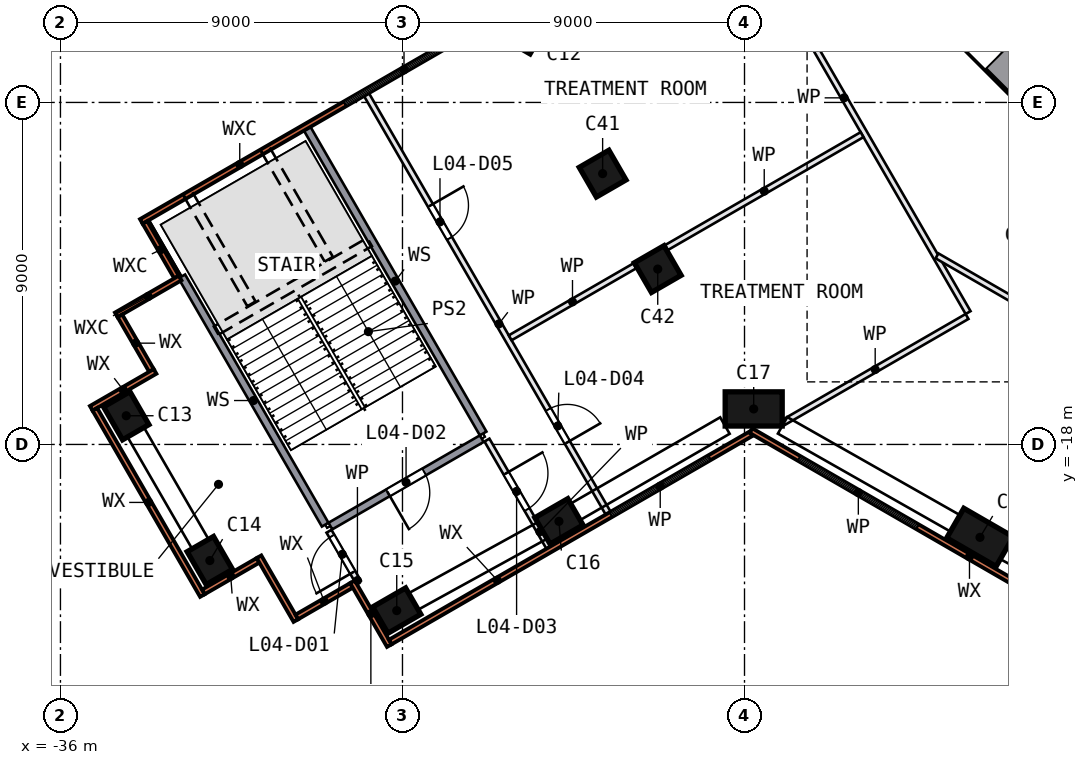
"""IFC4 building model, lengths in metres.
Left out: names, types, materials, properties, quantities, classifications, styles, units other than length and angle.
Written with IfcOpenShell. Run it as: python <this file> out.ifc"""

import sys

from ifc_helpers import new_model, si_unit, direction, frame, frame_2d, origin, origin_2d, place, context, subcontext, project, spatial, rectangle, extrude, element, fill, save


model = new_model("IFC4")
c1 = context("Model", 3, precision=1e-05, world=origin(), true_north=direction((0.0, 1.0)))
c2 = subcontext(c1, "Body", "Model", "MODEL_VIEW")
j1 = project(units=[si_unit("LENGTHUNIT", "METRE"), si_unit("PLANEANGLEUNIT", "RADIAN")], contexts=[c1])
p1 = place(None, origin())
s1 = spatial("IfcSite", under=j1, at=p1, CompositionType="ELEMENT")
p2 = place(p1, origin())
s2 = spatial("IfcBuilding", under=s1, at=p2, CompositionType="ELEMENT")
p3 = place(p2, frame((0.0, 0.0, 23.5)))
s3 = spatial("IfcBuildingStorey", under=s2, at=p3, CompositionType="ELEMENT", Elevation=23.5)
p4 = place(p3, frame((-23.658, -6.846, 0.0), z_axis=(0.0, 0.0, 1.0), x_axis=(0.5, 0.866025404, 0.0)))
e1 = element("IfcColumn", 1, at=p4, inside=s3, PredefinedType="COLUMN", context=c2, shape_type="SweptSolid", body=[
    extrude(rectangle(XDim=1.5, YDim=0.9, at=origin_2d()), origin(), (0.0, 0.0, 1.0), 4.0),
])
for number, where, z_axis, x_axis in (
    (2, (-34.269, -17.245, 0.0), (0.0, 0.0, 1.0), (0.5, -0.866, 0.0)),
    (3, (-32.069, -21.055, 0.0), (0.0, 0.0, 1.0), (0.5, -0.866, 0.0)),
    (4, (-27.151, -22.373, 0.0), (0.0, 0.0, 1.0), (0.866, 0.5, 0.0)),
    (5, (-22.883, -20.024, 0.0), (0.0, 0.0, 1.0), (0.866, 0.5, 0.0)),
):
    element("IfcColumn", number, at=place(p3, frame(where, z_axis=z_axis, x_axis=x_axis)), inside=s3, PredefinedType="COLUMN", context=c2, shape_type="SweptSolid", body=[
        extrude(rectangle(XDim=1.0, YDim=0.8, at=origin_2d()), origin(), (0.0, 0.0, 1.0), 4.0),
    ])
for number, where, z_axis, x_axis in (
    (6, (-17.758, -17.065, 0.0), (0.0, 0.0, 1.0), (-1.0, 0.0, 0.0)),
    (7, (-11.804, -20.445, 0.0), (0.0, 0.0, 1.0), (0.866, -0.5, 0.0)),
):
    element("IfcColumn", number, at=place(p3, frame(where, z_axis=z_axis, x_axis=x_axis)), inside=s3, PredefinedType="COLUMN", context=c2, shape_type="SweptSolid", body=[
        extrude(rectangle(XDim=1.5, YDim=0.9, at=origin_2d()), origin(), (0.0, 0.0, 1.0), 4.0),
    ])
for number, where, z_axis, x_axis in (
    (8, (-21.733, -10.873, 0.0), (0.0, 0.0, 1.0), (-0.866, -0.5, 0.0)),
    (9, (-20.283, -13.385, 0.0), (0.0, 0.0, 1.0), (-0.866, -0.5, 0.0)),
):
    element("IfcColumn", number, at=place(p3, frame(where, z_axis=z_axis, x_axis=x_axis)), inside=s3, PredefinedType="COLUMN", context=c2, shape_type="SweptSolid", body=[
        extrude(rectangle(XDim=0.9, YDim=0.9, at=origin_2d()), origin(), (0.0, 0.0, 1.0), 4.0),
    ])
p5 = place(p3, frame((-13.682, -5.481, 0.0), z_axis=(0.0, 0.0, 1.0), x_axis=(0.707106781, -0.707106781, 0.0)))
e10 = element("IfcWall", 10, at=p5, inside=s3, PredefinedType="SHEAR", context=c2, shape_type="SweptSolid", body=[
    extrude(rectangle(XDim=11.598, YDim=0.9, at=frame_2d((5.799, 0.0))), origin(), (0.0, 0.0, 1.0), 4.5),
])
p6 = place(p5, frame((2.099, 0.0, 0.0)))
e11 = element("IfcOpeningElement", 11, at=p6, cuts=e10, PredefinedType="OPENING", context=c2, shape_type="SweptSolid", body=[
    extrude(rectangle(XDim=1.2, YDim=2.1, at=frame_2d((0.6, 1.05))), frame((0.0, 0.46, 0.0), z_axis=(0.0, -1.0, 0.0), x_axis=(1.0, 0.0, 0.0)), (0.0, 0.0, 1.0), 0.92),
])
p7 = place(p3, frame((-23.995, -6.429, 0.0), z_axis=(0.0, 0.0, 1.0), x_axis=(-0.866018753, -0.500011519, 0.0)))
e12 = element("IfcWall", 12, at=p7, inside=s3, PredefinedType="SOLIDWALL", context=c2, shape_type="SweptSolid", body=[
    extrude(rectangle(XDim=11.405, YDim=0.14, at=frame_2d((5.703, 0.0))), origin(), (0.0, 0.0, 1.0), 4.0),
])
p8 = place(p7, frame((1.623, 0.0, 0.9)))
e13 = element("IfcOpeningElement", 13, at=p8, cuts=e12, PredefinedType="OPENING", context=c2, shape_type="SweptSolid", body=[
    extrude(rectangle(XDim=3.6, YDim=2.4, at=frame_2d((1.8, 1.2))), frame((0.0, 0.08, 0.0), z_axis=(0.0, -1.0, 0.0), x_axis=(1.0, 0.0, 0.0)), (0.0, 0.0, 1.0), 0.16),
])
p9 = place(p3, frame((-33.777, -12.157, 0.0), z_axis=(0.0, 0.0, 1.0), x_axis=(0.499887958, -0.866090081, 0.0)))
e14 = element("IfcWall", 14, at=p9, inside=s3, PredefinedType="SOLIDWALL", context=c2, shape_type="SweptSolid", body=[
    extrude(rectangle(XDim=1.66, YDim=0.14, at=frame_2d((0.83, 0.0))), origin(), (0.0, 0.0, 1.0), 4.0),
])
p10 = place(p3, frame((-32.851, -13.62, 0.0), z_axis=(0.0, 0.0, 1.0), x_axis=(-0.866011627, -0.500023862, 0.0)))
e15 = element("IfcWall", 15, at=p10, inside=s3, PredefinedType="SOLIDWALL", context=c2, shape_type="SweptSolid", body=[
    extrude(rectangle(XDim=1.94, YDim=0.14, at=frame_2d((0.97, 0.0))), origin(), (0.0, 0.0, 1.0), 4.0),
])
p11 = place(p3, frame((-34.436, -14.616, 0.0), z_axis=(0.0, 0.0, 1.0), x_axis=(0.500061949, -0.865989634, 0.0)))
e16 = element("IfcWall", 16, at=p11, inside=s3, PredefinedType="SOLIDWALL", context=c2, shape_type="SweptSolid", body=[
    extrude(rectangle(XDim=1.66, YDim=0.14, at=frame_2d((0.83, 0.0))), origin(), (0.0, 0.0, 1.0), 4.0),
])
p12 = place(p3, frame((-33.51, -16.079, 0.0), z_axis=(0.0, 0.0, 1.0), x_axis=(-0.866011627, -0.500023862, 0.0)))
e17 = element("IfcWall", 17, at=p12, inside=s3, PredefinedType="SOLIDWALL", context=c2, shape_type="SweptSolid", body=[
    extrude(rectangle(XDim=1.94, YDim=0.14, at=frame_2d((0.97, 0.0))), origin(), (0.0, 0.0, 1.0), 4.0),
])
p13 = place(p3, frame((-35.094, -17.075, 0.0), z_axis=(0.0, 0.0, 1.0), x_axis=(0.499998748, -0.866026127, 0.0)))
e18 = element("IfcWall", 18, at=p13, inside=s3, PredefinedType="SOLIDWALL", context=c2, shape_type="SweptSolid", body=[
    extrude(rectangle(XDim=5.66, YDim=0.14, at=frame_2d((2.83, 0.0))), origin(), (0.0, 0.0, 1.0), 4.0),
])
p14 = place(p3, frame((-32.239, -21.881, 0.0), z_axis=(0.0, 0.0, 1.0), x_axis=(0.866026406, 0.499998264, 0.0)))
e19 = element("IfcWall", 19, at=p14, inside=s3, PredefinedType="SOLIDWALL", context=c2, shape_type="SweptSolid", body=[
    extrude(rectangle(XDim=1.66, YDim=0.14, at=frame_2d((0.83, 0.0))), origin(), (0.0, 0.0, 1.0), 4.0),
])
p15 = place(p3, frame((-30.775, -20.955, 0.0), z_axis=(0.0, 0.0, 1.0), x_axis=(0.499969368, -0.866043088, 0.0)))
e20 = element("IfcWall", 20, at=p15, inside=s3, PredefinedType="SOLIDWALL", context=c2, shape_type="SweptSolid", body=[
    extrude(rectangle(XDim=1.94, YDim=0.14, at=frame_2d((0.97, 0.0))), origin(), (0.0, 0.0, 1.0), 4.0),
])
p16 = place(p3, frame((-29.78, -22.54, 0.0), z_axis=(0.0, 0.0, 1.0), x_axis=(0.865989634, 0.500061949, 0.0)))
e21 = element("IfcWall", 21, at=p16, inside=s3, PredefinedType="SOLIDWALL", context=c2, shape_type="SweptSolid", body=[
    extrude(rectangle(XDim=1.66, YDim=0.14, at=frame_2d((0.83, 0.0))), origin(), (0.0, 0.0, 1.0), 4.0),
])
p17 = place(p3, frame((-28.317, -21.614, 0.0), z_axis=(0.0, 0.0, 1.0), x_axis=(0.499969368, -0.866043088, 0.0)))
e22 = element("IfcWall", 22, at=p17, inside=s3, PredefinedType="SOLIDWALL", context=c2, shape_type="SweptSolid", body=[
    extrude(rectangle(XDim=1.94, YDim=0.14, at=frame_2d((0.97, 0.0))), origin(), (0.0, 0.0, 1.0), 4.0),
])
p18 = place(p3, frame((-27.321, -23.198, 0.0), z_axis=(0.0, 0.0, 1.0), x_axis=(0.866030546, 0.499991093, 0.0)))
e23 = element("IfcWall", 23, at=p18, inside=s3, PredefinedType="SOLIDWALL", context=c2, shape_type="SweptSolid", body=[
    extrude(rectangle(XDim=10.961, YDim=0.14, at=frame_2d((5.48, 0.0))), origin(), (0.0, 0.0, 1.0), 4.0),
])
p19 = place(p18, frame((6.702, 0.0, 0.9)))
e24 = element("IfcOpeningElement", 24, at=p19, cuts=e23, PredefinedType="OPENING", context=c2, shape_type="SweptSolid", body=[
    extrude(rectangle(XDim=3.0, YDim=2.4, at=frame_2d((1.5, 1.2))), frame((0.0, 0.08, 0.0), z_axis=(0.0, -1.0, 0.0), x_axis=(1.0, 0.0, 0.0)), (0.0, 0.0, 1.0), 0.16),
])
p20 = place(p3, frame((-17.828, -17.637, 0.0), z_axis=(0.0, 0.0, 1.0), x_axis=(0.866029009, -0.499993756, 0.0)))
e25 = element("IfcWall", 25, at=p20, inside=s3, PredefinedType="SOLIDWALL", context=c2, shape_type="SweptSolid", body=[
    extrude(rectangle(XDim=13.242, YDim=0.14, at=frame_2d((6.621, 0.0))), origin(), (0.0, 0.0, 1.0), 4.0),
])
p21 = place(p20, frame((1.46, 0.0, 0.9)))
e26 = element("IfcOpeningElement", 26, at=p21, cuts=e25, PredefinedType="OPENING", context=c2, shape_type="SweptSolid", body=[
    extrude(rectangle(XDim=3.6, YDim=2.4, at=frame_2d((1.8, 1.2))), frame((0.0, 0.08, 0.0), z_axis=(0.0, -1.0, 0.0), x_axis=(1.0, 0.0, 0.0)), (0.0, 0.0, 1.0), 0.16),
])
p22 = place(p20, frame((8.215, 0.0, 0.9)))
e27 = element("IfcOpeningElement", 27, at=p22, cuts=e25, PredefinedType="OPENING", context=c2, shape_type="SweptSolid", body=[
    extrude(rectangle(XDim=3.0, YDim=2.4, at=frame_2d((1.5, 1.2))), frame((0.0, 0.08, 0.0), z_axis=(0.0, -1.0, 0.0), x_axis=(1.0, 0.0, 0.0)), (0.0, 0.0, 1.0), 0.16),
])
p23 = place(p3, frame((-32.807, -13.577, 0.0), z_axis=(0.0, 0.0, 1.0), x_axis=(0.50000534, -0.866022321, 0.0)))
e28 = element("IfcWall", 28, at=p23, inside=s3, PredefinedType="SOLIDWALL", context=c2, shape_type="SweptSolid", body=[
    extrude(rectangle(XDim=7.545, YDim=0.2, at=frame_2d((3.773, 0.0))), origin(), (0.0, 0.0, 1.0), 4.0),
])
p24 = place(p3, frame((-28.162, -21.623, 0.0), z_axis=(0.0, 0.0, 1.0), x_axis=(-0.499877454, 0.866096144, 0.0)))
e29 = element("IfcWall", 29, at=p24, inside=s3, PredefinedType="PARTITIONING", context=c2, shape_type="SweptSolid", body=[
    extrude(rectangle(XDim=1.545, YDim=0.15, at=frame_2d((0.773, 0.0))), origin(), (0.0, 0.0, 1.0), 4.0),
])
p25 = place(p24, frame((0.295, 0.0, 0.0)))
e30 = element("IfcOpeningElement", 30, at=p25, cuts=e29, PredefinedType="OPENING", context=c2, shape_type="SweptSolid", body=[
    extrude(rectangle(XDim=1.1, YDim=2.1, at=frame_2d((0.55, 1.05))), frame((0.0, 0.085, 0.0), z_axis=(0.0, -1.0, 0.0), x_axis=(1.0, 0.0, 0.0)), (0.0, 0.0, 1.0), 0.17),
])
p26 = place(p3, frame((-24.914, -17.848, 0.0), z_axis=(0.0, 0.0, 1.0), x_axis=(-0.86601677, -0.500014953, 0.0)))
e31 = element("IfcWall", 31, at=p26, inside=s3, PredefinedType="SOLIDWALL", context=c2, shape_type="SweptSolid", body=[
    extrude(rectangle(XDim=4.6, YDim=0.2, at=frame_2d((2.3, 0.0))), origin(), (0.0, 0.0, 1.0), 4.0),
])
p27 = place(p26, frame((1.75, 0.0, 0.0)))
e32 = element("IfcOpeningElement", 32, at=p27, cuts=e31, PredefinedType="OPENING", context=c2, shape_type="SweptSolid", body=[
    extrude(rectangle(XDim=1.1, YDim=2.1, at=frame_2d((0.55, 1.05))), frame((0.0, 0.11, 0.0), z_axis=(0.0, -1.0, 0.0), x_axis=(1.0, 0.0, 0.0)), (0.0, 0.0, 1.0), 0.22),
])
p28 = place(p3, frame((-24.877, -17.712, 0.0), z_axis=(0.0, 0.0, 1.0), x_axis=(-0.499984148, 0.866034555, 0.0)))
e33 = element("IfcWall", 33, at=p28, inside=s3, PredefinedType="SOLIDWALL", context=c2, shape_type="SweptSolid", body=[
    extrude(rectangle(XDim=9.26, YDim=0.2, at=frame_2d((4.63, 0.0))), origin(), (0.0, 0.0, 1.0), 4.0),
])
p29 = place(p3, frame((-24.777, -17.885, 0.0), z_axis=(0.0, 0.0, 1.0), x_axis=(0.499996863, -0.866027215, 0.0)))
e34 = element("IfcWall", 34, at=p29, inside=s3, PredefinedType="PARTITIONING", context=c2, shape_type="SweptSolid", body=[
    extrude(rectangle(XDim=3.26, YDim=0.15, at=frame_2d((1.63, 0.0))), origin(), (0.0, 0.0, 1.0), 4.0),
])
p30 = place(p29, frame((1.01, 0.0, 0.0)))
e35 = element("IfcOpeningElement", 35, at=p30, cuts=e34, PredefinedType="OPENING", context=c2, shape_type="SweptSolid", body=[
    extrude(rectangle(XDim=1.1, YDim=2.1, at=frame_2d((0.55, 1.05))), frame((0.0, 0.085, 0.0), z_axis=(0.0, -1.0, 0.0), x_axis=(1.0, 0.0, 0.0)), (0.0, 0.0, 1.0), 0.17),
])
p31 = place(p3, frame((-27.948, -8.792, 0.0), z_axis=(0.0, 0.0, 1.0), x_axis=(0.499991053, -0.866030569, 0.0)))
e36 = element("IfcWall", 36, at=p31, inside=s3, PredefinedType="PARTITIONING", context=c2, shape_type="SweptSolid", body=[
    extrude(rectangle(XDim=12.72, YDim=0.15, at=frame_2d((6.36, 0.0))), origin(), (0.0, 0.0, 1.0), 4.0),
])
p32 = place(p31, frame((9.57, 0.0, 0.0)))
e37 = element("IfcOpeningElement", 37, at=p32, cuts=e36, PredefinedType="OPENING", context=c2, shape_type="SweptSolid", body=[
    extrude(rectangle(XDim=1.0, YDim=2.1, at=frame_2d((0.5, 1.05))), frame((0.0, 0.085, 0.0), z_axis=(0.0, -1.0, 0.0), x_axis=(1.0, 0.0, 0.0)), (0.0, 0.0, 1.0), 0.17),
])
p33 = place(p31, frame((3.37, 0.0, 0.0)))
e38 = element("IfcOpeningElement", 38, at=p33, cuts=e36, PredefinedType="OPENING", context=c2, shape_type="SweptSolid", body=[
    extrude(rectangle(XDim=1.0, YDim=2.1, at=frame_2d((0.5, 1.05))), frame((0.0, 0.085, 0.0), z_axis=(0.0, -1.0, 0.0), x_axis=(1.0, 0.0, 0.0)), (0.0, 0.0, 1.0), 0.17),
])
p34 = place(p3, frame((-18.642, -3.228, 0.0), z_axis=(0.0, 0.0, 1.0), x_axis=(0.499998298, -0.866026387, 0.0)))
e39 = element("IfcWall", 39, at=p34, inside=s3, PredefinedType="PARTITIONING", context=c2, shape_type="SweptSolid", body=[
    extrude(rectangle(XDim=13.05, YDim=0.15, at=frame_2d((6.525, 0.0))), origin(), (0.0, 0.0, 1.0), 4.0),
])
p35 = place(p3, frame((-16.978, -17.424, 0.0), z_axis=(0.0, 0.0, 1.0), x_axis=(0.866016603, 0.500015243, 0.0)))
e40 = element("IfcWall", 40, at=p35, inside=s3, PredefinedType="PARTITIONING", context=c2, shape_type="SweptSolid", body=[
    extrude(rectangle(XDim=5.582, YDim=0.15, at=frame_2d((2.791, 0.0))), origin(), (0.0, 0.0, 1.0), 4.0),
])
p36 = place(p3, frame((-20.886, -13.3, 0.0), z_axis=(0.0, 0.0, 1.0), x_axis=(-0.866012734, -0.500021944, 0.0)))
e41 = element("IfcWall", 41, at=p36, inside=s3, PredefinedType="PARTITIONING", context=c2, shape_type="SweptSolid", body=[
    extrude(rectangle(XDim=3.787, YDim=0.15, at=frame_2d((1.894, 0.0))), origin(), (0.0, 0.0, 1.0), 4.0),
])
p37 = place(p3, frame((-14.906, -9.848, 0.0), z_axis=(0.0, 0.0, 1.0), x_axis=(-0.866038559, -0.499977214, 0.0)))
e42 = element("IfcWall", 42, at=p37, inside=s3, PredefinedType="PARTITIONING", context=c2, shape_type="SweptSolid", body=[
    extrude(rectangle(XDim=5.945, YDim=0.15, at=frame_2d((2.973, 0.0))), origin(), (0.0, 0.0, 1.0), 4.0),
])
p38 = place(p3, frame((-12.935, -13.038, 0.0), z_axis=(0.0, 0.0, 1.0), x_axis=(0.866027519, -0.499996337, 0.0)))
e43 = element("IfcWall", 43, at=p38, inside=s3, PredefinedType="PARTITIONING", context=c2, shape_type="SweptSolid", body=[
    extrude(rectangle(XDim=9.517, YDim=0.15, at=frame_2d((4.758, 0.0))), origin(), (0.0, 0.0, 1.0), 4.0),
])
p39 = place(p38, frame((3.767, 0.0, 0.0)))
e44 = element("IfcOpeningElement", 44, at=p39, cuts=e43, PredefinedType="OPENING", context=c2, shape_type="SweptSolid", body=[
    extrude(rectangle(XDim=1.8, YDim=2.1, at=frame_2d((0.9, 1.05))), frame((0.0, 0.085, 0.0), z_axis=(0.0, -1.0, 0.0), x_axis=(1.0, 0.0, 0.0)), (0.0, 0.0, 1.0), 0.17),
])
p40 = place(p8, origin())
e45 = element("IfcWindow", 45, at=p40, inside=s3, PartitioningType="SINGLE_PANEL", PredefinedType="WINDOW", context=c2, shape_type="SweptSolid", body=[
    extrude(rectangle(XDim=3.6, YDim=2.4, at=frame_2d((1.8, 1.2))), frame((0.0, 0.03, 0.0), z_axis=(0.0, -1.0, 0.0), x_axis=(1.0, 0.0, 0.0)), (0.0, 0.0, 1.0), 0.06),
])
fill(e13, e45)
p41 = place(p19, origin())
e46 = element("IfcWindow", 46, at=p41, inside=s3, PartitioningType="SINGLE_PANEL", PredefinedType="WINDOW", context=c2, shape_type="SweptSolid", body=[
    extrude(rectangle(XDim=3.0, YDim=2.4, at=frame_2d((1.5, 1.2))), frame((0.0, 0.03, 0.0), z_axis=(0.0, -1.0, 0.0), x_axis=(1.0, 0.0, 0.0)), (0.0, 0.0, 1.0), 0.06),
])
fill(e24, e46)
p42 = place(p21, origin())
e47 = element("IfcWindow", 47, at=p42, inside=s3, PartitioningType="SINGLE_PANEL", PredefinedType="WINDOW", context=c2, shape_type="SweptSolid", body=[
    extrude(rectangle(XDim=3.6, YDim=2.4, at=frame_2d((1.8, 1.2))), frame((0.0, 0.03, 0.0), z_axis=(0.0, -1.0, 0.0), x_axis=(1.0, 0.0, 0.0)), (0.0, 0.0, 1.0), 0.06),
])
fill(e26, e47)
p43 = place(p6, origin())
e48 = element("IfcDoor", 48, at=p43, inside=s3, OperationType="SINGLE_SWING_LEFT", PredefinedType="DOOR", context=c2, shape_type="SweptSolid", body=[
    extrude(rectangle(XDim=1.2, YDim=2.1, at=frame_2d((0.6, 1.05))), frame((0.0, 0.025, 0.0), z_axis=(0.0, -1.0, 0.0), x_axis=(1.0, 0.0, 0.0)), (0.0, 0.0, 1.0), 0.05),
])
fill(e11, e48)
p44 = place(p25, origin())
e49 = element("IfcDoor", 49, at=p44, inside=s3, OperationType="SINGLE_SWING_LEFT", PredefinedType="DOOR", context=c2, shape_type="SweptSolid", body=[
    extrude(rectangle(XDim=1.1, YDim=2.1, at=frame_2d((0.55, 1.05))), frame((0.0, 0.025, 0.0), z_axis=(0.0, -1.0, 0.0), x_axis=(1.0, 0.0, 0.0)), (0.0, 0.0, 1.0), 0.05),
])
fill(e30, e49)
p45 = place(p27, origin())
e50 = element("IfcDoor", 50, at=p45, inside=s3, OperationType="SINGLE_SWING_RIGHT", PredefinedType="DOOR", context=c2, shape_type="SweptSolid", body=[
    extrude(rectangle(XDim=1.1, YDim=2.1, at=frame_2d((0.55, 1.05))), frame((0.0, 0.025, 0.0), z_axis=(0.0, -1.0, 0.0), x_axis=(1.0, 0.0, 0.0)), (0.0, 0.0, 1.0), 0.05),
])
fill(e32, e50)
p46 = place(p30, origin())
e51 = element("IfcDoor", 51, at=p46, inside=s3, OperationType="SINGLE_SWING_LEFT", PredefinedType="DOOR", context=c2, shape_type="SweptSolid", body=[
    extrude(rectangle(XDim=1.1, YDim=2.1, at=frame_2d((0.55, 1.05))), frame((0.0, 0.025, 0.0), z_axis=(0.0, -1.0, 0.0), x_axis=(1.0, 0.0, 0.0)), (0.0, 0.0, 1.0), 0.05),
])
fill(e35, e51)
p47 = place(p32, origin())
e52 = element("IfcDoor", 52, at=p47, inside=s3, OperationType="SINGLE_SWING_RIGHT", PredefinedType="DOOR", context=c2, shape_type="SweptSolid", body=[
    extrude(rectangle(XDim=1.0, YDim=2.1, at=frame_2d((0.5, 1.05))), frame((0.0, 0.025, 0.0), z_axis=(0.0, -1.0, 0.0), x_axis=(1.0, 0.0, 0.0)), (0.0, 0.0, 1.0), 0.05),
])
fill(e37, e52)
p48 = place(p33, origin())
e53 = element("IfcDoor", 53, at=p48, inside=s3, OperationType="SINGLE_SWING_LEFT", PredefinedType="DOOR", context=c2, shape_type="SweptSolid", body=[
    extrude(rectangle(XDim=1.0, YDim=2.1, at=frame_2d((0.5, 1.05))), frame((0.0, 0.025, 0.0), z_axis=(0.0, -1.0, 0.0), x_axis=(1.0, 0.0, 0.0)), (0.0, 0.0, 1.0), 0.05),
])
fill(e38, e53)
save(model, sys.argv[1])
